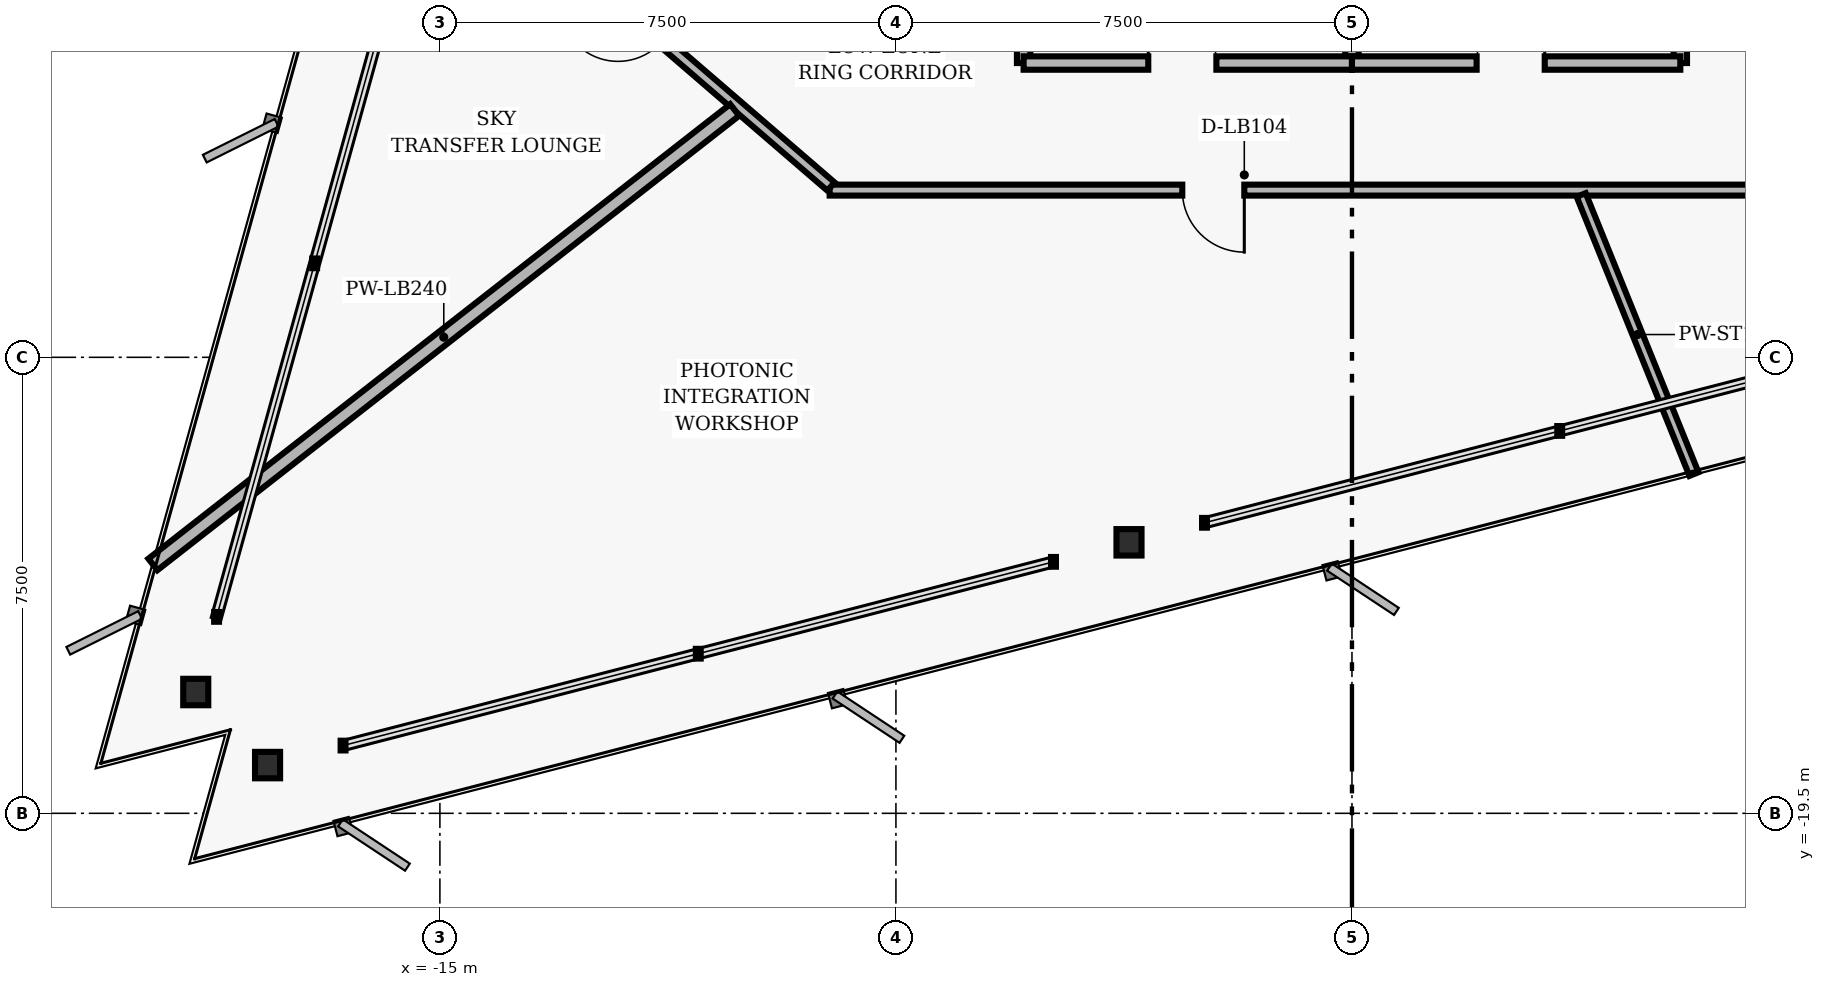
"""IFC4 building model, lengths in metres.
Left out: names, types, materials, properties, quantities, classifications, styles, units other than length and angle.
Written with IfcOpenShell. Run it as: python <this file> out.ifc"""

import sys

from ifc_helpers import new_model, si_unit, direction, frame, frame_2d, origin, origin_2d, place, context, subcontext, project, spatial, rectangle, i_section, extrude, element, fill, save


model = new_model("IFC4")
c1 = context("Model", 3, precision=1e-05, world=origin(), true_north=direction((0.0, 1.0)))
c2 = subcontext(c1, "Body", "Model", "MODEL_VIEW")
j1 = project(units=[si_unit("LENGTHUNIT", "METRE"), si_unit("PLANEANGLEUNIT", "RADIAN")], contexts=[c1])
p1 = place(None, origin())
s1 = spatial("IfcSite", under=j1, at=p1, CompositionType="ELEMENT")
p2 = place(p1, origin())
s2 = spatial("IfcBuilding", under=s1, at=p2, CompositionType="ELEMENT")
p3 = place(p2, frame((0.0, 0.0, 97.76)))
s3 = spatial("IfcBuildingStorey", under=s2, at=p3, CompositionType="ELEMENT", Elevation=97.76)
for number, where, z_axis, x_axis in (
    (1, (-19.015, -17.505, 0.0), (0.0, 0.0, 1.0), (1.0, 0.0, 0.0)),
    (2, (-17.834, -18.707, 0.0), (0.0, 0.0, 1.0), (1.0, 0.0, 0.0)),
    (3, (-3.667, -15.043, 0.0), (0.0, 0.0, 1.0), (1.0, 0.0, 0.0)),
):
    element("IfcColumn", number, at=place(p3, frame(where, z_axis=z_axis, x_axis=x_axis)), inside=s3, PredefinedType="COLUMN", context=c2, shape_type="SweptSolid", body=[
        extrude(i_section(OverallWidth=0.412, OverallDepth=0.435, WebThickness=0.036, FlangeThickness=0.057, FilletRadius=0.022, at=origin_2d()), origin(), (0.0, 0.0, 1.0), 3.04),
    ])
for number, where, z_axis, x_axis in (
    (4, (-5.4, -7.16, 0.0), (0.0, 0.0, 1.0), (0.0, 1.0, 0.0)),
    (5, (5.4, -7.16, 0.0), (0.0, 0.0, 1.0), (0.0, 1.0, 0.0)),
):
    element("IfcWall", number, at=place(p3, frame(where, z_axis=z_axis, x_axis=x_axis)), inside=s3, PredefinedType="PARTITIONING", context=c2, shape_type="SweptSolid", body=[
        extrude(rectangle(XDim=2.71, YDim=0.22, at=frame_2d((1.355, 0.0))), origin(), (0.0, 0.0, 1.0), 2.693),
    ])
p4 = place(p3, frame((0.0, -7.16, 0.0), z_axis=(0.0, 0.0, 1.0), x_axis=(0.0, 1.0, 0.0)))
e6 = element("IfcWall", 6, at=p4, inside=s3, PredefinedType="PARTITIONING", context=c2, shape_type="SweptSolid", body=[
    extrude(rectangle(XDim=2.81, YDim=0.22, at=frame_2d((1.405, 0.0))), origin(), (0.0, 0.0, 1.0), 2.693),
])
p5 = place(p3, frame((-5.4, -7.16, 0.0), z_axis=(0.0, 0.0, 1.0), x_axis=(1.0, 0.0, 0.0)))
e7 = element("IfcWall", 7, at=p5, inside=s3, PredefinedType="PARTITIONING", context=c2, shape_type="SweptSolid", body=[
    extrude(rectangle(XDim=5.4, YDim=0.22, at=frame_2d((2.7, 0.0))), origin(), (0.0, 0.0, 1.0), 2.693),
])
p6 = place(p5, frame((2.05, 0.0, 0.0)))
e8 = element("IfcOpeningElement", 8, at=p6, cuts=e7, PredefinedType="OPENING", context=c2, shape_type="SweptSolid", body=[
    extrude(rectangle(XDim=1.12, YDim=2.02, at=frame_2d((0.56, 1.01))), frame((0.0, 0.12, 0.0), z_axis=(0.0, -1.0, 0.0), x_axis=(1.0, 0.0, 0.0)), (0.0, 0.0, 1.0), 0.24),
])
p7 = place(p3, frame((0.0, -7.16, 0.0), z_axis=(0.0, 0.0, 1.0), x_axis=(1.0, 0.0, 0.0)))
e9 = element("IfcWall", 9, at=p7, inside=s3, PredefinedType="PARTITIONING", context=c2, shape_type="SweptSolid", body=[
    extrude(rectangle(XDim=5.4, YDim=0.22, at=frame_2d((2.7, 0.0))), origin(), (0.0, 0.0, 1.0), 2.693),
])
p8 = place(p7, frame((2.05, 0.0, 0.0)))
e10 = element("IfcOpeningElement", 10, at=p8, cuts=e9, PredefinedType="OPENING", context=c2, shape_type="SweptSolid", body=[
    extrude(rectangle(XDim=1.12, YDim=2.02, at=frame_2d((0.56, 1.01))), frame((0.0, 0.12, 0.0), z_axis=(0.0, -1.0, 0.0), x_axis=(1.0, 0.0, 0.0)), (0.0, 0.0, 1.0), 0.24),
])
p9 = place(p3, frame((8.41, -9.25, 0.0), z_axis=(0.0, 0.0, 1.0), x_axis=(-1.0, 0.0, 0.0)))
e11 = element("IfcWall", 11, at=p9, inside=s3, PredefinedType="PARTITIONING", context=c2, shape_type="SweptSolid", body=[
    extrude(rectangle(XDim=17.0, YDim=0.18, at=frame_2d((8.5, 0.0))), origin(), (0.0, 0.0, 1.0), 2.207),
])
p10 = place(p9, frame((10.181, 0.0, 0.0)))
e12 = element("IfcOpeningElement", 12, at=p10, cuts=e11, PredefinedType="OPENING", context=c2, shape_type="SweptSolid", body=[
    extrude(rectangle(XDim=1.02, YDim=2.02, at=frame_2d((0.51, 1.01))), frame((0.0, 0.1, 0.0), z_axis=(0.0, -1.0, 0.0), x_axis=(1.0, 0.0, 0.0)), (0.0, 0.0, 1.0), 0.2),
])
p11 = place(p3, frame((-8.568, -9.191, 0.0), z_axis=(0.0, 0.0, 1.0), x_axis=(-0.757556899173, 0.652769135694, 0.0)))
e13 = element("IfcWall", 13, at=p11, inside=s3, PredefinedType="PARTITIONING", context=c2, shape_type="SweptSolid", body=[
    extrude(rectangle(XDim=6.204, YDim=0.18, at=frame_2d((3.102, 0.0))), origin(), (0.0, 0.0, 1.0), 2.693),
])
p12 = place(p11, frame((3.664, 0.0, 0.0)))
e14 = element("IfcOpeningElement", 14, at=p12, cuts=e13, PredefinedType="OPENING", context=c2, shape_type="SweptSolid", body=[
    extrude(rectangle(XDim=0.96, YDim=2.02, at=frame_2d((0.48, 1.01))), frame((0.0, 0.1, 0.0), z_axis=(0.0, -1.0, 0.0), x_axis=(1.0, 0.0, 0.0)), (0.0, 0.0, 1.0), 0.2),
])
p13 = place(p3, frame((-10.152, -7.932, 0.0), z_axis=(0.0, 0.0, 1.0), x_axis=(-0.788016447684, -0.61565418717, 0.0)))
e15 = element("IfcWall", 15, at=p13, inside=s3, PredefinedType="PARTITIONING", context=c2, shape_type="SweptSolid", body=[
    extrude(rectangle(XDim=12.142, YDim=0.24, at=frame_2d((6.071, 0.0))), origin(), (0.0, 0.0, 1.0), 1.978),
])
p14 = place(p3, frame((3.77, -9.33, 0.0), z_axis=(0.0, 0.0, 1.0), x_axis=(0.374635876877, -0.927172022743, 0.0)))
e16 = element("IfcWall", 16, at=p14, inside=s3, PredefinedType="PARTITIONING", context=c2, shape_type="SweptSolid", body=[
    extrude(rectangle(XDim=4.951, YDim=0.16, at=frame_2d((2.476, 0.0))), origin(), (0.0, 0.0, 1.0), 2.693),
])
p15 = place(p6, origin())
e17 = element("IfcDoor", 17, at=p15, inside=s3, OperationType="SINGLE_SWING_LEFT", PredefinedType="DOOR", context=c2, shape_type="SweptSolid", body=[
    extrude(rectangle(XDim=1.12, YDim=2.02, at=frame_2d((0.56, 1.01))), frame((0.0, 0.025, 0.0), z_axis=(0.0, -1.0, 0.0), x_axis=(1.0, 0.0, 0.0)), (0.0, 0.0, 1.0), 0.05),
])
fill(e8, e17)
p16 = place(p8, origin())
e18 = element("IfcDoor", 18, at=p16, inside=s3, OperationType="SINGLE_SWING_RIGHT", PredefinedType="DOOR", context=c2, shape_type="SweptSolid", body=[
    extrude(rectangle(XDim=1.12, YDim=2.02, at=frame_2d((0.56, 1.01))), frame((0.0, 0.025, 0.0), z_axis=(0.0, -1.0, 0.0), x_axis=(1.0, 0.0, 0.0)), (0.0, 0.0, 1.0), 0.05),
])
fill(e10, e18)
p17 = place(p10, origin())
e19 = element("IfcDoor", 19, at=p17, inside=s3, OperationType="SINGLE_SWING_LEFT", PredefinedType="DOOR", context=c2, shape_type="SweptSolid", body=[
    extrude(rectangle(XDim=1.02, YDim=2.02, at=frame_2d((0.51, 1.01))), frame((0.0, 0.025, 0.0), z_axis=(0.0, -1.0, 0.0), x_axis=(1.0, 0.0, 0.0)), (0.0, 0.0, 1.0), 0.05),
])
fill(e12, e19)
save(model, sys.argv[1])
